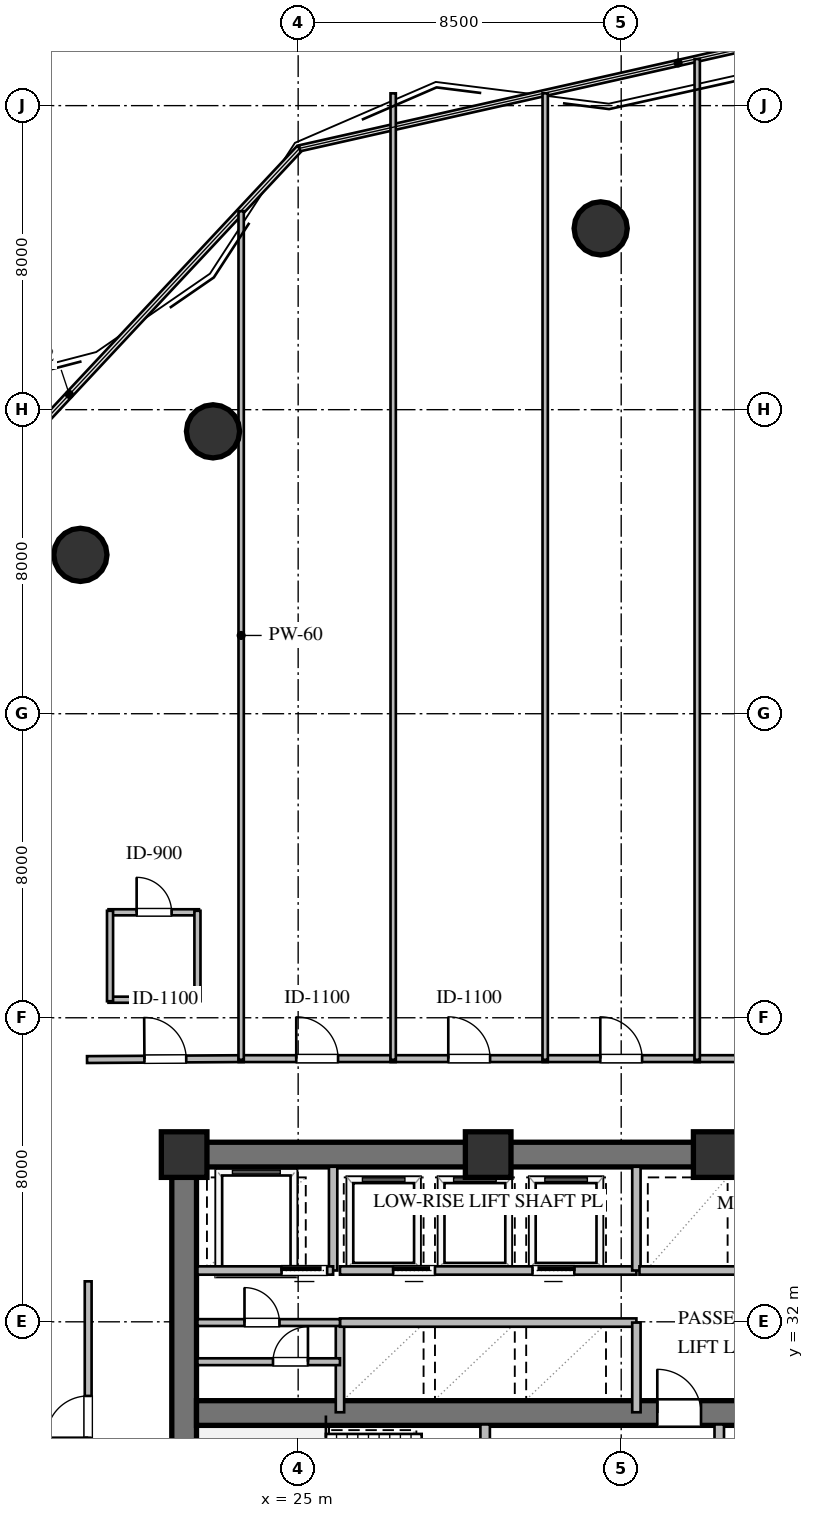
"""IFC4 building model, lengths in metres.
Left out: names, types, materials, properties, quantities, classifications, styles, units other than length and angle.
Written with IfcOpenShell. Run it as: python <this file> out.ifc"""

import sys

from ifc_helpers import new_model, si_unit, direction, frame, frame_2d, origin, origin_2d, place, context, subcontext, project, spatial, rectangle, circle, extrude, element, fill, save


model = new_model("IFC4")
c1 = context("Model", 3, precision=1e-05, world=origin(), true_north=direction((0.0, 1.0)))
c2 = subcontext(c1, "Body", "Model", "MODEL_VIEW")
j1 = project(units=[si_unit("LENGTHUNIT", "METRE"), si_unit("PLANEANGLEUNIT", "RADIAN")], contexts=[c1])
p1 = place(None, origin())
s1 = spatial("IfcSite", under=j1, at=p1, CompositionType="ELEMENT")
p2 = place(p1, origin())
s2 = spatial("IfcBuilding", under=s1, at=p2, CompositionType="ELEMENT")
p3 = place(p2, frame((0.0, 0.0, 24.0)))
s3 = spatial("IfcBuildingStorey", under=s2, at=p3, CompositionType="ELEMENT", Elevation=24.0)
p4 = place(p3, frame((21.675, 36.4, 0.0), z_axis=(0.0, 0.0, 1.0), x_axis=(1.0, 0.0, 0.0)))
e1 = element("IfcWall", 1, at=p4, inside=s3, PredefinedType="SHEAR", context=c2, shape_type="SweptSolid", body=[
    extrude(rectangle(XDim=22.65, YDim=0.65, at=frame_2d((11.325, 0.0))), origin(), (0.0, 0.0, 1.0), 3.36),
])
p5 = place(p3, frame((22.0, 23.925, 0.0), z_axis=(0.0, 0.0, 1.0), x_axis=(0.0, 1.0, 0.0)))
e2 = element("IfcWall", 2, at=p5, inside=s3, PredefinedType="SHEAR", context=c2, shape_type="SweptSolid", body=[
    extrude(rectangle(XDim=12.15, YDim=0.65, at=frame_2d((6.075, 0.0))), origin(), (0.0, 0.0, 1.0), 3.36),
])
p6 = place(p3, frame((22.325, 29.6, 0.0), z_axis=(0.0, 0.0, 1.0), x_axis=(1.0, 0.0, 0.0)))
e3 = element("IfcWall", 3, at=p6, inside=s3, PredefinedType="SHEAR", context=c2, shape_type="SweptSolid", body=[
    extrude(rectangle(XDim=21.35, YDim=0.65, at=frame_2d((10.675, 0.0))), origin(), (0.0, 0.0, 1.0), 3.36),
])
p7 = place(p6, frame((12.125, 0.0, 0.0)))
e4 = element("IfcOpeningElement", 4, at=p7, cuts=e3, PredefinedType="OPENING", context=c2, shape_type="SweptSolid", body=[
    extrude(rectangle(XDim=1.15, YDim=2.1, at=frame_2d((0.575, 1.05))), frame((0.0, 0.335, 0.0), z_axis=(0.0, -1.0, 0.0), x_axis=(1.0, 0.0, 0.0)), (0.0, 0.0, 1.0), 0.67),
])
for number, where, z_axis, x_axis in (
    (5, (36.0, 36.4, 0.0), (0.0, 0.0, 1.0), (1.0, 0.0, 0.0)),
    (6, (30.0, 36.4, 0.0), (0.0, 0.0, 1.0), (1.0, 0.0, 0.0)),
    (7, (22.0, 36.4, 0.0), (0.0, 0.0, 1.0), (1.0, 0.0, 0.0)),
):
    element("IfcColumn", number, at=place(p3, frame(where, z_axis=z_axis, x_axis=x_axis)), inside=s3, PredefinedType="COLUMN", context=c2, shape_type="SweptSolid", body=[
        extrude(rectangle(XDim=1.2, YDim=1.2, at=origin_2d()), origin(), (0.0, 0.0, 1.0), 3.6),
    ])
for number, where, z_axis, x_axis in (
    (8, (32.96, 60.77, 0.0), (0.0, 0.0, 1.0), (1.0, 0.0, 0.0)),
    (9, (22.76, 55.43, 0.0), (0.0, 0.0, 1.0), (1.0, 0.0, 0.0)),
    (10, (19.27, 52.18, 0.0), (0.0, 0.0, 1.0), (1.0, 0.0, 0.0)),
):
    element("IfcColumn", number, at=place(p3, frame(where, z_axis=z_axis, x_axis=x_axis)), inside=s3, PredefinedType="COLUMN", context=c2, shape_type="SweptSolid", body=[
        extrude(circle(Radius=0.7, at=origin_2d()), origin(), (0.0, 0.0, 1.0), 3.6),
    ])
p8 = place(p3, frame((29.92, 23.9, 0.0), z_axis=(0.0, 0.0, 1.0), x_axis=(0.0, 1.0, 0.0)))
e11 = element("IfcWall", 11, at=p8, inside=s3, PredefinedType="SOLIDWALL", context=c2, shape_type="SweptSolid", body=[
    extrude(rectangle(XDim=5.4, YDim=0.25, at=frame_2d((2.7, 0.0))), origin(), (0.0, 0.0, 1.0), 3.36),
])
p9 = place(p8, frame((3.421, 0.0, 0.0)))
e12 = element("IfcOpeningElement", 12, at=p9, cuts=e11, PredefinedType="OPENING", context=c2, shape_type="SweptSolid", body=[
    extrude(rectangle(XDim=1.15, YDim=2.1, at=frame_2d((0.575, 1.05))), frame((0.0, 0.135, 0.0), z_axis=(0.0, -1.0, 0.0), x_axis=(1.0, 0.0, 0.0)), (0.0, 0.0, 1.0), 0.27),
])
p10 = place(p3, frame((36.08, 23.9, 0.0), z_axis=(0.0, 0.0, 1.0), x_axis=(0.0, 1.0, 0.0)))
e13 = element("IfcWall", 13, at=p10, inside=s3, PredefinedType="SOLIDWALL", context=c2, shape_type="SweptSolid", body=[
    extrude(rectangle(XDim=5.4, YDim=0.25, at=frame_2d((2.7, 0.0))), origin(), (0.0, 0.0, 1.0), 3.36),
])
p11 = place(p10, frame((3.421, 0.0, 0.0)))
e14 = element("IfcOpeningElement", 14, at=p11, cuts=e13, PredefinedType="OPENING", context=c2, shape_type="SweptSolid", body=[
    extrude(rectangle(XDim=1.15, YDim=2.1, at=frame_2d((0.575, 1.05))), frame((0.0, 0.135, 0.0), z_axis=(0.0, -1.0, 0.0), x_axis=(1.0, 0.0, 0.0)), (0.0, 0.0, 1.0), 0.27),
])
p12 = place(p3, frame((25.92, 33.35, 0.0), z_axis=(0.0, 0.0, 1.0), x_axis=(0.0, 1.0, 0.0)))
e15 = element("IfcWall", 15, at=p12, inside=s3, PredefinedType="SOLIDWALL", context=c2, shape_type="SweptSolid", body=[
    extrude(rectangle(XDim=2.73, YDim=0.22, at=frame_2d((1.365, 0.0))), origin(), (0.0, 0.0, 1.0), 3.36),
])
p13 = place(p3, frame((22.35, 33.35, 0.0), z_axis=(0.0, 0.0, 1.0), x_axis=(1.0, 0.0, 0.0)))
e16 = element("IfcWall", 16, at=p13, inside=s3, PredefinedType="SOLIDWALL", context=c2, shape_type="SweptSolid", body=[
    extrude(rectangle(XDim=3.57, YDim=0.22, at=frame_2d((1.785, 0.0))), origin(), (0.0, 0.0, 1.0), 3.36),
])
p14 = place(p13, frame((2.213, 0.0, 0.0)))
e17 = element("IfcOpeningElement", 17, at=p14, cuts=e16, PredefinedType="OPENING", context=c2, shape_type="SweptSolid", body=[
    extrude(rectangle(XDim=1.2, YDim=2.1, at=frame_2d((0.6, 1.05))), frame((0.0, 0.12, 0.0), z_axis=(0.0, -1.0, 0.0), x_axis=(1.0, 0.0, 0.0)), (0.0, 0.0, 1.0), 0.24),
])
p15 = place(p3, frame((26.1, 29.62, 0.0), z_axis=(0.0, 0.0, 1.0), x_axis=(0.0, 1.0, 0.0)))
e18 = element("IfcWall", 18, at=p15, inside=s3, PredefinedType="SOLIDWALL", context=c2, shape_type="SweptSolid", body=[
    extrude(rectangle(XDim=2.36, YDim=0.22, at=frame_2d((1.18, 0.0))), origin(), (0.0, 0.0, 1.0), 3.36),
])
p16 = place(p3, frame((26.1, 31.98, 0.0), z_axis=(0.0, 0.0, 1.0), x_axis=(1.0, 0.0, 0.0)))
e19 = element("IfcWall", 19, at=p16, inside=s3, PredefinedType="SOLIDWALL", context=c2, shape_type="SweptSolid", body=[
    extrude(rectangle(XDim=7.8, YDim=0.22, at=frame_2d((3.9, 0.0))), origin(), (0.0, 0.0, 1.0), 3.36),
])
p17 = place(p3, frame((33.9, 29.62, 0.0), z_axis=(0.0, 0.0, 1.0), x_axis=(0.0, 1.0, 0.0)))
e20 = element("IfcWall", 20, at=p17, inside=s3, PredefinedType="SOLIDWALL", context=c2, shape_type="SweptSolid", body=[
    extrude(rectangle(XDim=2.36, YDim=0.22, at=frame_2d((1.18, 0.0))), origin(), (0.0, 0.0, 1.0), 3.36),
])
p18 = place(p3, frame((26.1, 33.35, 0.0), z_axis=(0.0, 0.0, 1.0), x_axis=(1.0, 0.0, 0.0)))
e21 = element("IfcWall", 21, at=p18, inside=s3, PredefinedType="SOLIDWALL", context=c2, shape_type="SweptSolid", body=[
    extrude(rectangle(XDim=7.8, YDim=0.22, at=frame_2d((3.9, 0.0))), origin(), (0.0, 0.0, 1.0), 3.36),
])
p19 = place(p18, frame((1.4, 0.0, 0.0)))
e22 = element("IfcOpeningElement", 22, at=p19, cuts=e21, PredefinedType="OPENING", context=c2, shape_type="SweptSolid", body=[
    extrude(rectangle(XDim=1.1, YDim=2.1, at=frame_2d((0.55, 1.05))), frame((0.0, 0.12, 0.0), z_axis=(0.0, -1.0, 0.0), x_axis=(1.0, 0.0, 0.0)), (0.0, 0.0, 1.0), 0.24),
])
p20 = place(p18, frame((5.066, 0.0, 0.0)))
e23 = element("IfcOpeningElement", 23, at=p20, cuts=e21, PredefinedType="OPENING", context=c2, shape_type="SweptSolid", body=[
    extrude(rectangle(XDim=1.1, YDim=2.1, at=frame_2d((0.55, 1.05))), frame((0.0, 0.12, 0.0), z_axis=(0.0, -1.0, 0.0), x_axis=(1.0, 0.0, 0.0)), (0.0, 0.0, 1.0), 0.24),
])
p21 = place(p3, frame((33.9, 33.35, 0.0), z_axis=(0.0, 0.0, 1.0), x_axis=(0.0, 1.0, 0.0)))
e24 = element("IfcWall", 24, at=p21, inside=s3, PredefinedType="SOLIDWALL", context=c2, shape_type="SweptSolid", body=[
    extrude(rectangle(XDim=2.73, YDim=0.22, at=frame_2d((1.365, 0.0))), origin(), (0.0, 0.0, 1.0), 3.36),
])
p22 = place(p3, frame((33.98, 33.35, 0.0), z_axis=(0.0, 0.0, 1.0), x_axis=(1.0, 0.0, 0.0)))
e25 = element("IfcWall", 25, at=p22, inside=s3, PredefinedType="SOLIDWALL", context=c2, shape_type="SweptSolid", body=[
    extrude(rectangle(XDim=7.54, YDim=0.22, at=frame_2d((3.77, 0.0))), origin(), (0.0, 0.0, 1.0), 3.36),
])
p23 = place(p3, frame((22.35, 30.95, 0.0), z_axis=(0.0, 0.0, 1.0), x_axis=(1.0, 0.0, 0.0)))
e26 = element("IfcWall", 26, at=p23, inside=s3, PredefinedType="PARTITIONING", context=c2, shape_type="SweptSolid", body=[
    extrude(rectangle(XDim=3.75, YDim=0.18, at=frame_2d((1.875, 0.0))), origin(), (0.0, 0.0, 1.0), 3.36),
])
p24 = place(p23, frame((1.988, 0.0, 0.0)))
e27 = element("IfcOpeningElement", 27, at=p24, cuts=e26, PredefinedType="OPENING", context=c2, shape_type="SweptSolid", body=[
    extrude(rectangle(XDim=0.92, YDim=2.1, at=frame_2d((0.46, 1.05))), frame((0.0, 0.1, 0.0), z_axis=(0.0, -1.0, 0.0), x_axis=(1.0, 0.0, 0.0)), (0.0, 0.0, 1.0), 0.2),
])
p25 = place(p3, frame((22.35, 31.98, 0.0), z_axis=(0.0, 0.0, 1.0), x_axis=(1.0, 0.0, 0.0)))
e28 = element("IfcWall", 28, at=p25, inside=s3, PredefinedType="PARTITIONING", context=c2, shape_type="SweptSolid", body=[
    extrude(rectangle(XDim=3.75, YDim=0.18, at=frame_2d((1.875, 0.0))), origin(), (0.0, 0.0, 1.0), 3.36),
])
p26 = place(p25, frame((1.238, 0.0, 0.0)))
e29 = element("IfcOpeningElement", 29, at=p26, cuts=e28, PredefinedType="OPENING", context=c2, shape_type="SweptSolid", body=[
    extrude(rectangle(XDim=0.92, YDim=2.1, at=frame_2d((0.46, 1.05))), frame((0.0, 0.1, 0.0), z_axis=(0.0, -1.0, 0.0), x_axis=(1.0, 0.0, 0.0)), (0.0, 0.0, 1.0), 0.2),
])
p27 = place(p3, frame((20.01, 40.475, 0.0), z_axis=(0.0, 0.0, 1.0), x_axis=(1.0, 0.0, 0.0)))
e30 = element("IfcWall", 30, at=p27, inside=s3, PredefinedType="PLUMBINGWALL", context=c2, shape_type="SweptSolid", body=[
    extrude(rectangle(XDim=2.38, YDim=0.16, at=frame_2d((1.19, 0.0))), origin(), (0.0, 0.0, 1.0), 3.36),
])
p28 = place(p3, frame((20.01, 42.775, 0.0), z_axis=(0.0, 0.0, 1.0), x_axis=(1.0, 0.0, 0.0)))
e31 = element("IfcWall", 31, at=p28, inside=s3, PredefinedType="PLUMBINGWALL", context=c2, shape_type="SweptSolid", body=[
    extrude(rectangle(XDim=2.38, YDim=0.16, at=frame_2d((1.19, 0.0))), origin(), (0.0, 0.0, 1.0), 3.36),
])
p29 = place(p28, frame((0.74, 0.0, 0.0)))
e32 = element("IfcOpeningElement", 32, at=p29, cuts=e31, PredefinedType="OPENING", context=c2, shape_type="SweptSolid", body=[
    extrude(rectangle(XDim=0.92, YDim=2.1, at=frame_2d((0.46, 1.05))), frame((0.0, 0.09, 0.0), z_axis=(0.0, -1.0, 0.0), x_axis=(1.0, 0.0, 0.0)), (0.0, 0.0, 1.0), 0.18),
])
p30 = place(p3, frame((20.05, 40.435, 0.0), z_axis=(0.0, 0.0, 1.0), x_axis=(0.0, 1.0, 0.0)))
e33 = element("IfcWall", 33, at=p30, inside=s3, PredefinedType="PLUMBINGWALL", context=c2, shape_type="SweptSolid", body=[
    extrude(rectangle(XDim=2.38, YDim=0.16, at=frame_2d((1.19, 0.0))), origin(), (0.0, 0.0, 1.0), 3.36),
])
p31 = place(p3, frame((22.35, 40.435, 0.0), z_axis=(0.0, 0.0, 1.0), x_axis=(0.0, 1.0, 0.0)))
e34 = element("IfcWall", 34, at=p31, inside=s3, PredefinedType="PLUMBINGWALL", context=c2, shape_type="SweptSolid", body=[
    extrude(rectangle(XDim=2.38, YDim=0.16, at=frame_2d((1.19, 0.0))), origin(), (0.0, 0.0, 1.0), 2.89),
])
p32 = place(p3, frame((19.445, 38.9, 0.0), z_axis=(0.0, 0.0, 1.0), x_axis=(0.999981372921, 0.00610359001, 0.0)))
e35 = element("IfcWall", 35, at=p32, inside=s3, PredefinedType="PARTITIONING", context=c2, shape_type="SweptSolid", body=[
    extrude(rectangle(XDim=4.12, YDim=0.18, at=frame_2d((2.06, 0.0))), origin(), (0.0, 0.0, 1.0), 3.36),
])
p33 = place(p32, frame((1.51, 0.0, 0.0)))
e36 = element("IfcOpeningElement", 36, at=p33, cuts=e35, PredefinedType="OPENING", context=c2, shape_type="SweptSolid", body=[
    extrude(rectangle(XDim=1.1, YDim=2.1, at=frame_2d((0.55, 1.05))), frame((0.0, 0.1, 0.0), z_axis=(0.0, -1.0, 0.0), x_axis=(1.0, 0.0, 0.0)), (0.0, 0.0, 1.0), 0.2),
])
p34 = place(p3, frame((23.435, 38.925, 0.0), z_axis=(0.0, 0.0, 1.0), x_axis=(1.0, 0.0, 0.0)))
e37 = element("IfcWall", 37, at=p34, inside=s3, PredefinedType="PARTITIONING", context=c2, shape_type="SweptSolid", body=[
    extrude(rectangle(XDim=4.13, YDim=0.18, at=frame_2d((2.065, 0.0))), origin(), (0.0, 0.0, 1.0), 3.36),
])
p35 = place(p34, frame((1.515, 0.0, 0.0)))
e38 = element("IfcOpeningElement", 38, at=p35, cuts=e37, PredefinedType="OPENING", context=c2, shape_type="SweptSolid", body=[
    extrude(rectangle(XDim=1.1, YDim=2.1, at=frame_2d((0.55, 1.05))), frame((0.0, 0.1, 0.0), z_axis=(0.0, -1.0, 0.0), x_axis=(1.0, 0.0, 0.0)), (0.0, 0.0, 1.0), 0.2),
])
p36 = place(p3, frame((27.435, 38.925, 0.0), z_axis=(0.0, 0.0, 1.0), x_axis=(1.0, 0.0, 0.0)))
e39 = element("IfcWall", 39, at=p36, inside=s3, PredefinedType="PARTITIONING", context=c2, shape_type="SweptSolid", body=[
    extrude(rectangle(XDim=4.13, YDim=0.18, at=frame_2d((2.065, 0.0))), origin(), (0.0, 0.0, 1.0), 3.36),
])
p37 = place(p36, frame((1.515, 0.0, 0.0)))
e40 = element("IfcOpeningElement", 40, at=p37, cuts=e39, PredefinedType="OPENING", context=c2, shape_type="SweptSolid", body=[
    extrude(rectangle(XDim=1.1, YDim=2.1, at=frame_2d((0.55, 1.05))), frame((0.0, 0.1, 0.0), z_axis=(0.0, -1.0, 0.0), x_axis=(1.0, 0.0, 0.0)), (0.0, 0.0, 1.0), 0.2),
])
p38 = place(p3, frame((31.435, 38.925, 0.0), z_axis=(0.0, 0.0, 1.0), x_axis=(1.0, 0.0, 0.0)))
e41 = element("IfcWall", 41, at=p38, inside=s3, PredefinedType="PARTITIONING", context=c2, shape_type="SweptSolid", body=[
    extrude(rectangle(XDim=4.13, YDim=0.18, at=frame_2d((2.065, 0.0))), origin(), (0.0, 0.0, 1.0), 3.36),
])
p39 = place(p38, frame((1.515, 0.0, 0.0)))
e42 = element("IfcOpeningElement", 42, at=p39, cuts=e41, PredefinedType="OPENING", context=c2, shape_type="SweptSolid", body=[
    extrude(rectangle(XDim=1.1, YDim=2.1, at=frame_2d((0.55, 1.05))), frame((0.0, 0.1, 0.0), z_axis=(0.0, -1.0, 0.0), x_axis=(1.0, 0.0, 0.0)), (0.0, 0.0, 1.0), 0.2),
])
p40 = place(p3, frame((35.435, 38.925, 0.0), z_axis=(0.0, 0.0, 1.0), x_axis=(1.0, 0.0, 0.0)))
e43 = element("IfcWall", 43, at=p40, inside=s3, PredefinedType="PARTITIONING", context=c2, shape_type="SweptSolid", body=[
    extrude(rectangle(XDim=4.38, YDim=0.18, at=frame_2d((2.19, 0.0))), origin(), (0.0, 0.0, 1.0), 3.36),
])
p41 = place(p40, frame((1.64, 0.0, 0.0)))
e44 = element("IfcOpeningElement", 44, at=p41, cuts=e43, PredefinedType="OPENING", context=c2, shape_type="SweptSolid", body=[
    extrude(rectangle(XDim=1.1, YDim=2.1, at=frame_2d((0.55, 1.05))), frame((0.0, 0.1, 0.0), z_axis=(0.0, -1.0, 0.0), x_axis=(1.0, 0.0, 0.0)), (0.0, 0.0, 1.0), 0.2),
])
p42 = place(p3, frame((19.475, 25.935, 0.0), z_axis=(0.0, 0.0, 1.0), x_axis=(0.0, 1.0, 0.0)))
e45 = element("IfcWall", 45, at=p42, inside=s3, PredefinedType="PARTITIONING", context=c2, shape_type="SweptSolid", body=[
    extrude(rectangle(XDim=7.13, YDim=0.18, at=frame_2d((3.565, 0.0))), origin(), (0.0, 0.0, 1.0), 2.738),
])
p43 = place(p42, frame((3.015, 0.0, 0.0)))
e46 = element("IfcOpeningElement", 46, at=p43, cuts=e45, PredefinedType="OPENING", context=c2, shape_type="SweptSolid", body=[
    extrude(rectangle(XDim=1.1, YDim=2.1, at=frame_2d((0.55, 1.05))), frame((0.0, 0.1, 0.0), z_axis=(0.0, -1.0, 0.0), x_axis=(1.0, 0.0, 0.0)), (0.0, 0.0, 1.0), 0.2),
])
p44 = place(p3, frame((23.5, 61.224, 0.0), z_axis=(0.0, 0.0, 1.0), x_axis=(0.0, -1.0, 0.0)))
e47 = element("IfcWall", 47, at=p44, inside=s3, PredefinedType="PARTITIONING", context=c2, shape_type="SweptSolid", body=[
    extrude(rectangle(XDim=22.329, YDim=0.14, at=frame_2d((11.164, 0.0))), origin(), (0.0, 0.0, 1.0), 3.36),
])
p45 = place(p3, frame((27.5, 64.323, 0.0), z_axis=(0.0, 0.0, 1.0), x_axis=(0.0, -1.0, 0.0)))
e48 = element("IfcWall", 48, at=p45, inside=s3, PredefinedType="PARTITIONING", context=c2, shape_type="SweptSolid", body=[
    extrude(rectangle(XDim=25.428, YDim=0.14, at=frame_2d((12.714, 0.0))), origin(), (0.0, 0.0, 1.0), 3.36),
])
p46 = place(p3, frame((31.5, 64.324, 0.0), z_axis=(0.0, 0.0, 1.0), x_axis=(0.0, -1.0, 0.0)))
e49 = element("IfcWall", 49, at=p46, inside=s3, PredefinedType="PARTITIONING", context=c2, shape_type="SweptSolid", body=[
    extrude(rectangle(XDim=25.429, YDim=0.14, at=frame_2d((12.714, 0.0))), origin(), (0.0, 0.0, 1.0), 2.89),
])
p47 = place(p3, frame((35.5, 65.226, 0.0), z_axis=(0.0, 0.0, 1.0), x_axis=(0.0, -1.0, 0.0)))
e50 = element("IfcWall", 50, at=p47, inside=s3, PredefinedType="PARTITIONING", context=c2, shape_type="SweptSolid", body=[
    extrude(rectangle(XDim=26.331, YDim=0.14, at=frame_2d((13.165, 0.0))), origin(), (0.0, 0.0, 1.0), 3.36),
])
p48 = place(p7, origin())
e51 = element("IfcDoor", 51, at=p48, inside=s3, OperationType="SINGLE_SWING_LEFT", PredefinedType="DOOR", context=c2, shape_type="SweptSolid", body=[
    extrude(rectangle(XDim=1.15, YDim=2.1, at=frame_2d((0.575, 1.05))), frame((0.0, 0.025, 0.0), z_axis=(0.0, -1.0, 0.0), x_axis=(1.0, 0.0, 0.0)), (0.0, 0.0, 1.0), 0.05),
])
fill(e4, e51)
p49 = place(p14, origin())
e52 = element("IfcDoor", 52, at=p49, inside=s3, OperationType="SLIDING_TO_LEFT", PredefinedType="DOOR", context=c2, shape_type="SweptSolid", body=[
    extrude(rectangle(XDim=1.2, YDim=2.1, at=frame_2d((0.6, 1.05))), frame((0.0, 0.025, 0.0), z_axis=(0.0, -1.0, 0.0), x_axis=(1.0, 0.0, 0.0)), (0.0, 0.0, 1.0), 0.05),
])
fill(e17, e52)
p50 = place(p19, origin())
e53 = element("IfcDoor", 53, at=p50, inside=s3, OperationType="SLIDING_TO_LEFT", PredefinedType="DOOR", context=c2, shape_type="SweptSolid", body=[
    extrude(rectangle(XDim=1.1, YDim=2.1, at=frame_2d((0.55, 1.05))), frame((0.0, 0.025, 0.0), z_axis=(0.0, -1.0, 0.0), x_axis=(1.0, 0.0, 0.0)), (0.0, 0.0, 1.0), 0.05),
])
fill(e22, e53)
p51 = place(p20, origin())
e54 = element("IfcDoor", 54, at=p51, inside=s3, OperationType="SLIDING_TO_RIGHT", PredefinedType="DOOR", context=c2, shape_type="SweptSolid", body=[
    extrude(rectangle(XDim=1.1, YDim=2.1, at=frame_2d((0.55, 1.05))), frame((0.0, 0.025, 0.0), z_axis=(0.0, -1.0, 0.0), x_axis=(1.0, 0.0, 0.0)), (0.0, 0.0, 1.0), 0.05),
])
fill(e23, e54)
p52 = place(p26, origin())
e55 = element("IfcDoor", 55, at=p52, inside=s3, OperationType="SINGLE_SWING_LEFT", PredefinedType="DOOR", context=c2, shape_type="SweptSolid", body=[
    extrude(rectangle(XDim=0.92, YDim=2.1, at=frame_2d((0.46, 1.05))), frame((0.0, 0.025, 0.0), z_axis=(0.0, -1.0, 0.0), x_axis=(1.0, 0.0, 0.0)), (0.0, 0.0, 1.0), 0.05),
])
fill(e29, e55)
p53 = place(p24, origin())
e56 = element("IfcDoor", 56, at=p53, inside=s3, OperationType="SINGLE_SWING_RIGHT", PredefinedType="DOOR", context=c2, shape_type="SweptSolid", body=[
    extrude(rectangle(XDim=0.92, YDim=2.1, at=frame_2d((0.46, 1.05))), frame((0.0, 0.025, 0.0), z_axis=(0.0, -1.0, 0.0), x_axis=(1.0, 0.0, 0.0)), (0.0, 0.0, 1.0), 0.05),
])
fill(e27, e56)
p54 = place(p29, origin())
e57 = element("IfcDoor", 57, at=p54, inside=s3, OperationType="SINGLE_SWING_LEFT", PredefinedType="DOOR", context=c2, shape_type="SweptSolid", body=[
    extrude(rectangle(XDim=0.92, YDim=2.1, at=frame_2d((0.46, 1.05))), frame((0.0, 0.025, 0.0), z_axis=(0.0, -1.0, 0.0), x_axis=(1.0, 0.0, 0.0)), (0.0, 0.0, 1.0), 0.05),
])
fill(e32, e57)
p55 = place(p33, origin())
e58 = element("IfcDoor", 58, at=p55, inside=s3, OperationType="SINGLE_SWING_LEFT", PredefinedType="DOOR", context=c2, shape_type="SweptSolid", body=[
    extrude(rectangle(XDim=1.1, YDim=2.1, at=frame_2d((0.55, 1.05))), frame((0.0, 0.025, 0.0), z_axis=(0.0, -1.0, 0.0), x_axis=(1.0, 0.0, 0.0)), (0.0, 0.0, 1.0), 0.05),
])
fill(e36, e58)
p56 = place(p35, origin())
e59 = element("IfcDoor", 59, at=p56, inside=s3, OperationType="SINGLE_SWING_LEFT", PredefinedType="DOOR", context=c2, shape_type="SweptSolid", body=[
    extrude(rectangle(XDim=1.1, YDim=2.1, at=frame_2d((0.55, 1.05))), frame((0.0, 0.025, 0.0), z_axis=(0.0, -1.0, 0.0), x_axis=(1.0, 0.0, 0.0)), (0.0, 0.0, 1.0), 0.05),
])
fill(e38, e59)
p57 = place(p37, origin())
e60 = element("IfcDoor", 60, at=p57, inside=s3, OperationType="SINGLE_SWING_LEFT", PredefinedType="DOOR", context=c2, shape_type="SweptSolid", body=[
    extrude(rectangle(XDim=1.1, YDim=2.1, at=frame_2d((0.55, 1.05))), frame((0.0, 0.025, 0.0), z_axis=(0.0, -1.0, 0.0), x_axis=(1.0, 0.0, 0.0)), (0.0, 0.0, 1.0), 0.05),
])
fill(e40, e60)
p58 = place(p39, origin())
e61 = element("IfcDoor", 61, at=p58, inside=s3, OperationType="SINGLE_SWING_LEFT", PredefinedType="DOOR", context=c2, shape_type="SweptSolid", body=[
    extrude(rectangle(XDim=1.1, YDim=2.1, at=frame_2d((0.55, 1.05))), frame((0.0, 0.025, 0.0), z_axis=(0.0, -1.0, 0.0), x_axis=(1.0, 0.0, 0.0)), (0.0, 0.0, 1.0), 0.05),
])
fill(e42, e61)
p59 = place(p43, origin())
e62 = element("IfcDoor", 62, at=p59, inside=s3, OperationType="SINGLE_SWING_LEFT", PredefinedType="DOOR", context=c2, shape_type="SweptSolid", body=[
    extrude(rectangle(XDim=1.1, YDim=2.1, at=frame_2d((0.55, 1.05))), frame((0.0, 0.025, 0.0), z_axis=(0.0, -1.0, 0.0), x_axis=(1.0, 0.0, 0.0)), (0.0, 0.0, 1.0), 0.05),
])
fill(e46, e62)
save(model, sys.argv[1])
